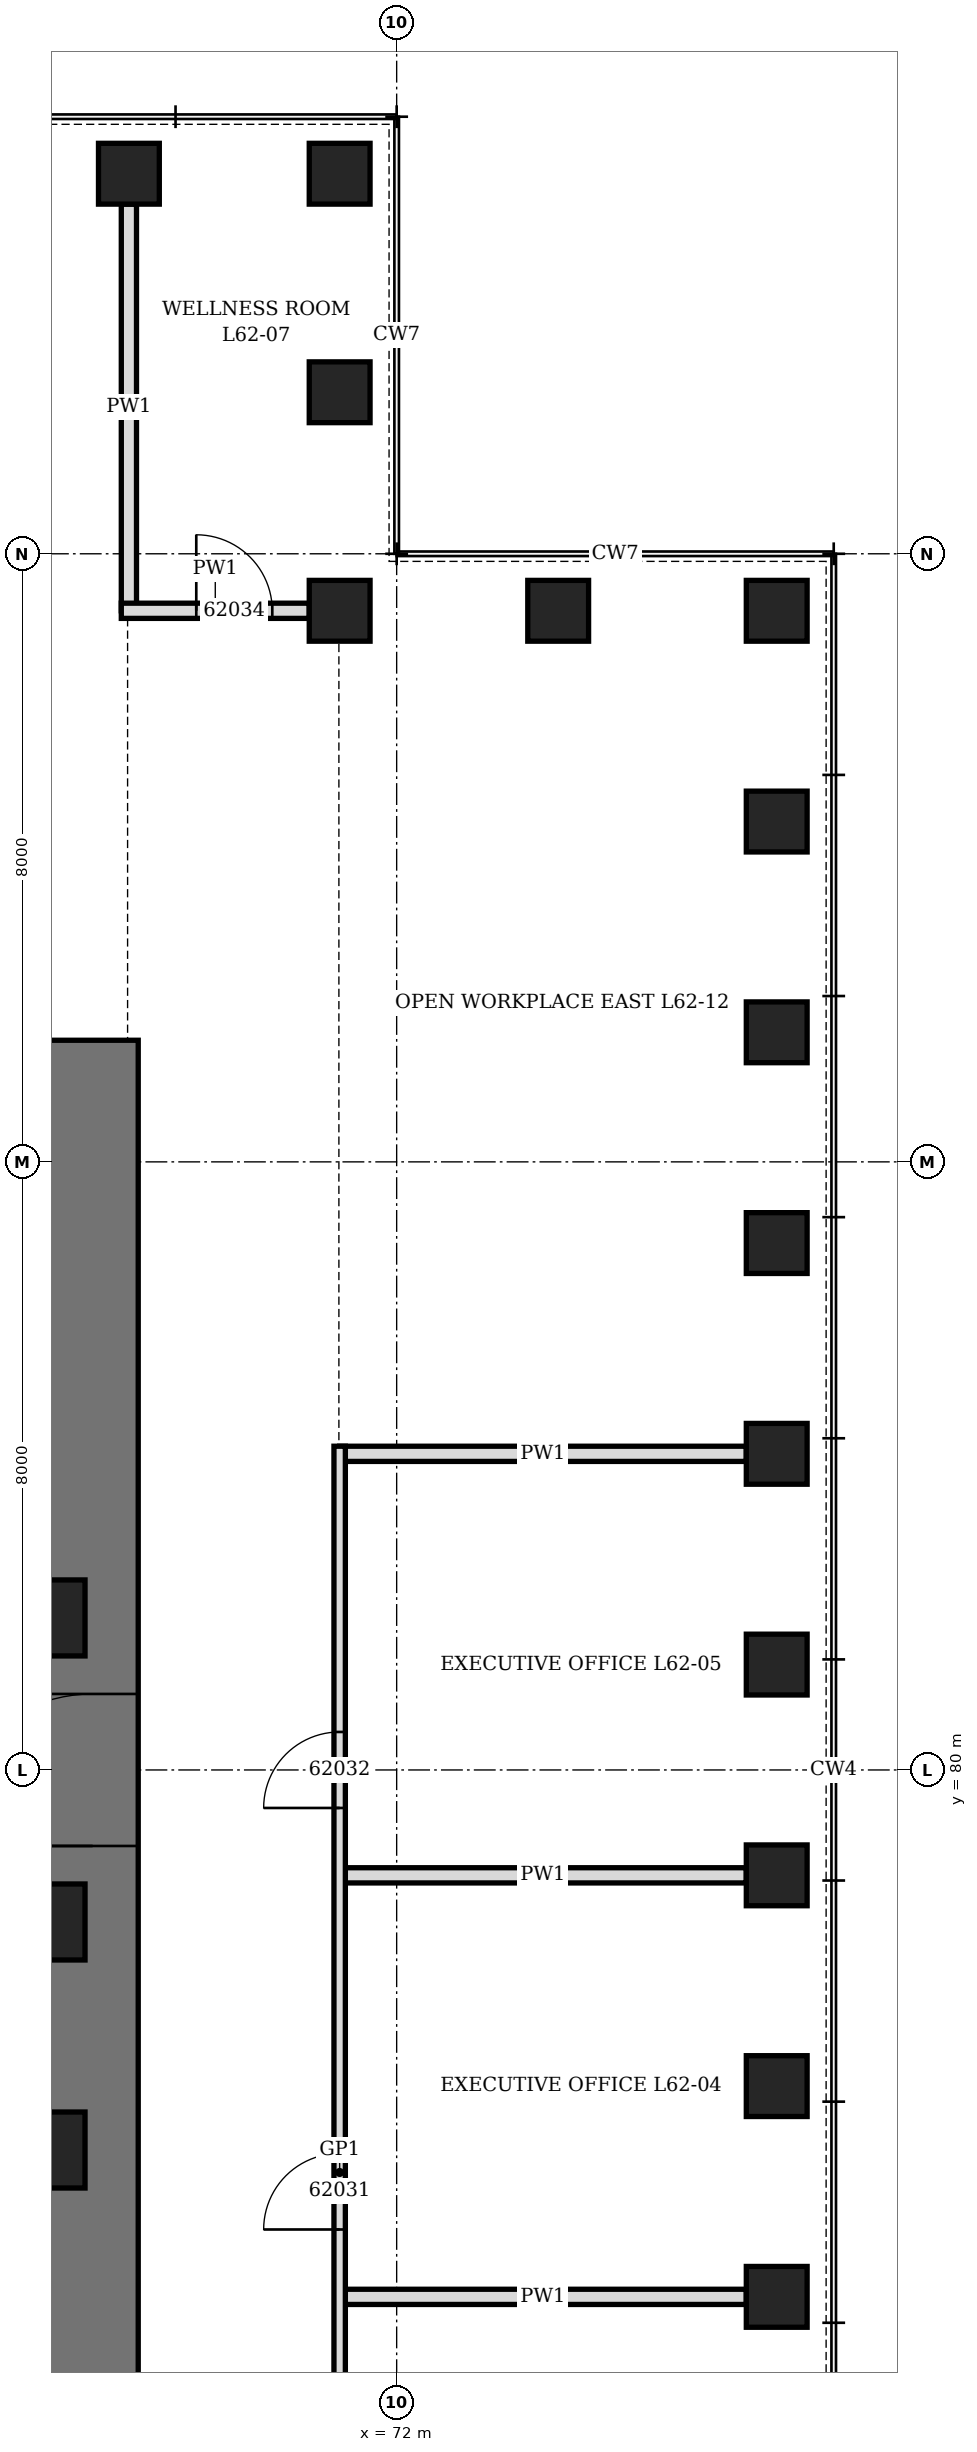
"""IFC4 building model, lengths in metres.
Left out: names, types, materials, properties, quantities, classifications, styles, units other than length and angle.
Written with IfcOpenShell. Run it as: python <this file> out.ifc"""

import sys

from ifc_helpers import new_model, si_unit, direction, frame, frame_2d, origin, origin_2d, place, context, subcontext, project, spatial, rectangle, hollow_rectangle, extrude, element, fill, save


model = new_model("IFC4")
c1 = context("Model", 3, precision=1e-05, world=origin(), true_north=direction((0.0, 1.0)))
c2 = subcontext(c1, "Body", "Model", "MODEL_VIEW")
j1 = project(units=[si_unit("LENGTHUNIT", "METRE"), si_unit("PLANEANGLEUNIT", "RADIAN")], contexts=[c1])
p1 = place(None, origin())
s1 = spatial("IfcSite", under=j1, at=p1, CompositionType="ELEMENT")
p2 = place(p1, origin())
s2 = spatial("IfcBuilding", under=s1, at=p2, CompositionType="ELEMENT")
p3 = place(p2, frame((0.0, 0.0, 275.5)))
s3 = spatial("IfcBuildingStorey", under=s2, at=p3, CompositionType="ELEMENT", Elevation=275.5)
for number, where, z_axis, x_axis in (
    (1, (77.0, 73.068, 0.0), (0.0, 0.0, 1.0), (0.0, 1.0, 0.0)),
    (2, (77.0, 75.841, 0.0), (0.0, 0.0, 1.0), (0.0, 1.0, 0.0)),
    (3, (77.0, 78.614, 0.0), (0.0, 0.0, 1.0), (0.0, 1.0, 0.0)),
    (4, (77.0, 81.386, 0.0), (0.0, 0.0, 1.0), (0.0, 1.0, 0.0)),
    (5, (77.0, 84.159, 0.0), (0.0, 0.0, 1.0), (0.0, 1.0, 0.0)),
    (6, (77.0, 86.932, 0.0), (0.0, 0.0, 1.0), (0.0, 1.0, 0.0)),
    (7, (77.0, 89.705, 0.0), (0.0, 0.0, 1.0), (0.0, 1.0, 0.0)),
    (8, (77.0, 92.477, 0.0), (0.0, 0.0, 1.0), (0.0, 1.0, 0.0)),
    (9, (77.0, 95.25, 0.0), (0.0, 0.0, 1.0), (1.0, 0.0, 0.0)),
    (10, (74.125, 95.25, 0.0), (0.0, 0.0, 1.0), (1.0, 0.0, 0.0)),
    (11, (71.25, 95.25, 0.0), (0.0, 0.0, 1.0), (0.0, 1.0, 0.0)),
    (12, (71.25, 98.125, 0.0), (0.0, 0.0, 1.0), (0.0, 1.0, 0.0)),
    (13, (71.25, 101.0, 0.0), (0.0, 0.0, 1.0), (1.0, 0.0, 0.0)),
    (14, (68.477, 101.0, 0.0), (0.0, 0.0, 1.0), (1.0, 0.0, 0.0)),
):
    element("IfcColumn", number, at=place(p3, frame(where, z_axis=z_axis, x_axis=x_axis)), inside=s3, PredefinedType="COLUMN", context=c2, shape_type="SweptSolid", body=[
        extrude(hollow_rectangle(XDim=0.8, YDim=0.8, WallThickness=0.1, at=origin_2d()), origin(), (0.0, 0.0, 1.0), 3.95),
    ])
p4 = place(p3, frame((68.0, 70.4, 0.0), z_axis=(0.0, 0.0, 1.0), x_axis=(0.0, 1.0, 0.0)))
e15 = element("IfcWall", 15, at=p4, inside=s3, PredefinedType="SHEAR", context=c2, shape_type="SweptSolid", body=[
    extrude(rectangle(XDim=19.2, YDim=1.2, at=frame_2d((9.6, 0.0))), origin(), (0.0, 0.0, 1.0), 4.2),
])
p5 = place(p4, frame((8.6, 0.0, 0.0)))
e16 = element("IfcOpeningElement", 16, at=p5, cuts=e15, PredefinedType="OPENING", context=c2, shape_type="SweptSolid", body=[
    extrude(rectangle(XDim=2.0, YDim=2.4, at=frame_2d((1.0, 1.2))), frame((0.0, 0.61, 0.0), z_axis=(0.0, -1.0, 0.0), x_axis=(1.0, 0.0, 0.0)), (0.0, 0.0, 1.0), 1.22),
])
for number, where, z_axis, x_axis in (
    (17, (67.4, 75.0, 0.0), (0.0, 0.0, 1.0), (1.0, 0.0, 0.0)),
    (18, (67.4, 78.0, 0.0), (0.0, 0.0, 1.0), (1.0, 0.0, 0.0)),
    (19, (67.4, 82.0, 0.0), (0.0, 0.0, 1.0), (1.0, 0.0, 0.0)),
):
    element("IfcColumn", number, at=place(p3, frame(where, z_axis=z_axis, x_axis=x_axis)), inside=s3, PredefinedType="COLUMN", context=c2, shape_type="SweptSolid", body=[
        extrude(hollow_rectangle(XDim=1.0, YDim=1.0, WallThickness=0.15, at=origin_2d()), origin(), (0.0, 0.0, 1.0), 4.2),
    ])
for number, where, z_axis, x_axis in (
    (20, (71.25, 73.068, 0.0), (0.0, 0.0, 1.0), (1.0, 0.0, 0.0)),
    (21, (71.25, 78.614, 0.0), (0.0, 0.0, 1.0), (1.0, 0.0, 0.0)),
    (22, (71.25, 84.159, 0.0), (0.0, 0.0, 1.0), (1.0, 0.0, 0.0)),
):
    element("IfcWall", number, at=place(p3, frame(where, z_axis=z_axis, x_axis=x_axis)), inside=s3, PredefinedType="PARTITIONING", context=c2, shape_type="SweptSolid", body=[
        extrude(rectangle(XDim=5.35, YDim=0.2, at=frame_2d((2.675, 0.0))), origin(), (0.0, 0.0, 1.0), 1.95),
    ])
p6 = place(p3, frame((68.477, 95.25, 0.0), z_axis=(0.0, 0.0, 1.0), x_axis=(0.0, 1.0, 0.0)))
e23 = element("IfcWall", 23, at=p6, inside=s3, PredefinedType="PARTITIONING", context=c2, shape_type="SweptSolid", body=[
    extrude(rectangle(XDim=5.35, YDim=0.2, at=frame_2d((2.675, 0.0))), origin(), (0.0, 0.0, 1.0), 2.45),
])
p7 = place(p3, frame((68.377, 95.25, 0.0), z_axis=(0.0, 0.0, 1.0), x_axis=(1.0, 0.0, 0.0)))
e24 = element("IfcWall", 24, at=p7, inside=s3, PredefinedType="PARTITIONING", context=c2, shape_type="SweptSolid", body=[
    extrude(rectangle(XDim=2.473, YDim=0.2, at=frame_2d((1.236, 0.0))), origin(), (0.0, 0.0, 1.0), 3.95),
])
p8 = place(p7, frame((0.986, 0.0, 0.0)))
e25 = element("IfcOpeningElement", 25, at=p8, cuts=e24, PredefinedType="OPENING", context=c2, shape_type="SweptSolid", body=[
    extrude(rectangle(XDim=1.0, YDim=2.1, at=frame_2d((0.5, 1.05))), frame((0.0, 0.11, 0.0), z_axis=(0.0, -1.0, 0.0), x_axis=(1.0, 0.0, 0.0)), (0.0, 0.0, 1.0), 0.22),
])
p9 = place(p3, frame((71.25, 65.15, 0.0), z_axis=(0.0, 0.0, 1.0), x_axis=(0.0, 1.0, 0.0)))
e26 = element("IfcWall", 26, at=p9, inside=s3, PredefinedType="PARTITIONING", context=c2, shape_type="SweptSolid", body=[
    extrude(rectangle(XDim=19.109, YDim=0.15, at=frame_2d((9.555, 0.0))), origin(), (0.0, 0.0, 1.0), 2.45),
])
p10 = place(p9, frame((3.259, 0.0, 0.0)))
e27 = element("IfcOpeningElement", 27, at=p10, cuts=e26, PredefinedType="OPENING", context=c2, shape_type="SweptSolid", body=[
    extrude(rectangle(XDim=1.0, YDim=2.1, at=frame_2d((0.5, 1.05))), frame((0.0, 0.085, 0.0), z_axis=(0.0, -1.0, 0.0), x_axis=(1.0, 0.0, 0.0)), (0.0, 0.0, 1.0), 0.17),
])
p11 = place(p9, frame((8.804, 0.0, 0.0)))
e28 = element("IfcOpeningElement", 28, at=p11, cuts=e26, PredefinedType="OPENING", context=c2, shape_type="SweptSolid", body=[
    extrude(rectangle(XDim=1.0, YDim=2.1, at=frame_2d((0.5, 1.05))), frame((0.0, 0.085, 0.0), z_axis=(0.0, -1.0, 0.0), x_axis=(1.0, 0.0, 0.0)), (0.0, 0.0, 1.0), 0.17),
])
p12 = place(p9, frame((14.35, 0.0, 0.0)))
e29 = element("IfcOpeningElement", 29, at=p12, cuts=e26, PredefinedType="OPENING", context=c2, shape_type="SweptSolid", body=[
    extrude(rectangle(XDim=1.0, YDim=2.1, at=frame_2d((0.5, 1.05))), frame((0.0, 0.085, 0.0), z_axis=(0.0, -1.0, 0.0), x_axis=(1.0, 0.0, 0.0)), (0.0, 0.0, 1.0), 0.17),
])
p13 = place(p5, origin())
e30 = element("IfcDoor", 30, at=p13, inside=s3, OperationType="DOUBLE_DOOR_SINGLE_SWING", PredefinedType="DOOR", context=c2, shape_type="SweptSolid", body=[
    extrude(rectangle(XDim=2.0, YDim=2.4, at=frame_2d((1.0, 1.2))), frame((0.0, 0.35, 0.0), z_axis=(0.0, -1.0, 0.0), x_axis=(1.0, 0.0, 0.0)), (0.0, 0.0, 1.0), 0.7),
])
fill(e16, e30)
p14 = place(p11, origin())
e31 = element("IfcDoor", 31, at=p14, inside=s3, OperationType="SINGLE_SWING_LEFT", PredefinedType="DOOR", context=c2, shape_type="SweptSolid", body=[
    extrude(rectangle(XDim=1.0, YDim=2.1, at=frame_2d((0.5, 1.05))), frame((0.0, 0.075, 0.0), z_axis=(0.0, -1.0, 0.0), x_axis=(1.0, 0.0, 0.0)), (0.0, 0.0, 1.0), 0.149),
])
fill(e28, e31)
p15 = place(p12, origin())
e32 = element("IfcDoor", 32, at=p15, inside=s3, OperationType="SINGLE_SWING_LEFT", PredefinedType="DOOR", context=c2, shape_type="SweptSolid", body=[
    extrude(rectangle(XDim=1.0, YDim=2.1, at=frame_2d((0.5, 1.05))), frame((0.0, 0.075, 0.0), z_axis=(0.0, -1.0, 0.0), x_axis=(1.0, 0.0, 0.0)), (0.0, 0.0, 1.0), 0.149),
])
fill(e29, e32)
p16 = place(p8, origin())
e33 = element("IfcDoor", 33, at=p16, inside=s3, OperationType="SINGLE_SWING_LEFT", PredefinedType="DOOR", context=c2, shape_type="SweptSolid", body=[
    extrude(rectangle(XDim=1.0, YDim=2.1, at=frame_2d((0.5, 1.05))), frame((0.0, 0.1, 0.0), z_axis=(0.0, -1.0, 0.0), x_axis=(1.0, 0.0, 0.0)), (0.0, 0.0, 1.0), 0.199),
])
fill(e25, e33)
save(model, sys.argv[1])
